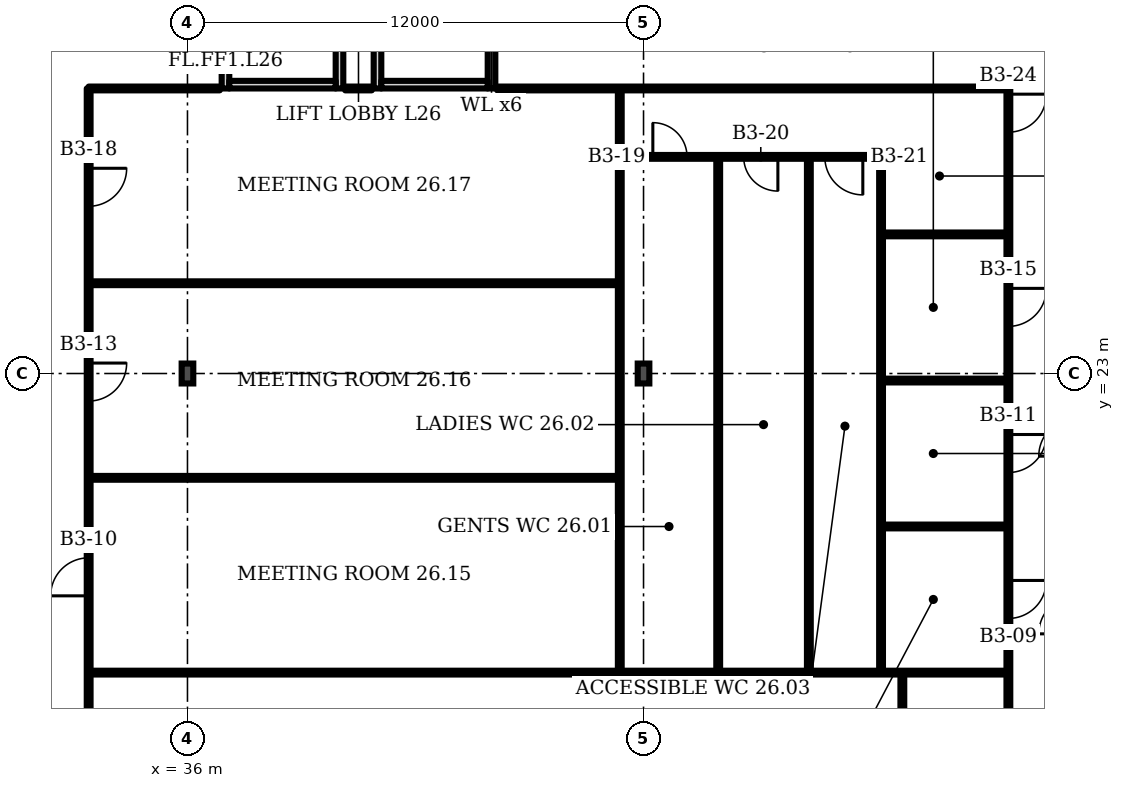
"""IFC4 building model, lengths in metres.
Left out: names, types, materials, properties, quantities, classifications, styles, units other than length and angle.
Written with IfcOpenShell. Run it as: python <this file> out.ifc"""

import sys

from ifc_helpers import new_model, si_unit, direction, frame, frame_2d, origin, origin_2d, place, context, subcontext, project, spatial, rectangle, i_section, extrude, element, fill, save


model = new_model("IFC4")
c1 = context("Model", 3, precision=1e-05, world=origin(), true_north=direction((0.0, 1.0)))
c2 = subcontext(c1, "Body", "Model", "MODEL_VIEW")
j1 = project(units=[si_unit("LENGTHUNIT", "METRE"), si_unit("PLANEANGLEUNIT", "RADIAN")], contexts=[c1])
p1 = place(None, origin())
s1 = spatial("IfcSite", under=j1, at=p1, CompositionType="ELEMENT")
p2 = place(p1, origin())
s2 = spatial("IfcBuilding", under=s1, at=p2, CompositionType="ELEMENT")
p3 = place(p2, frame((0.0, 0.0, 114.7)))
s3 = spatial("IfcBuildingStorey", under=s2, at=p3, CompositionType="ELEMENT", Elevation=114.7)
for number, where, z_axis, x_axis in (
    (1, (36.0, 23.0, 0.0), (0.0, 0.0, 1.0), (1.0, 0.0, 0.0)),
    (2, (48.0, 23.0, 0.0), (0.0, 0.0, 1.0), (1.0, 0.0, 0.0)),
):
    element("IfcColumn", number, at=place(p3, frame(where, z_axis=z_axis, x_axis=x_axis)), inside=s3, PredefinedType="COLUMN", context=c2, shape_type="SweptSolid", body=[
        extrude(i_section(OverallWidth=0.306, OverallDepth=0.524, WebThickness=0.021, FlangeThickness=0.04, FilletRadius=0.027, at=origin_2d()), origin(), (0.0, 0.0, 1.0), 3.6),
    ])
p4 = place(p3, frame((37.0, 30.5, 0.0), z_axis=(0.0, 0.0, 1.0), x_axis=(0.0, 1.0, 0.0)))
e3 = element("IfcWall", 3, at=p4, inside=s3, PredefinedType="PARTITIONING", context=c2, shape_type="SweptSolid", body=[
    extrude(rectangle(XDim=3.5, YDim=0.2, at=frame_2d((1.75, 0.0))), origin(), (0.0, 0.0, 1.0), 3.2),
])
p5 = place(p4, frame((1.2, 0.0, 0.0)))
e4 = element("IfcOpeningElement", 4, at=p5, cuts=e3, PredefinedType="OPENING", context=c2, shape_type="SweptSolid", body=[
    extrude(rectangle(XDim=1.1, YDim=2.1, at=frame_2d((0.55, 1.05))), frame((0.0, 0.11, 0.0), z_axis=(0.0, -1.0, 0.0), x_axis=(1.0, 0.0, 0.0)), (0.0, 0.0, 1.0), 0.22),
])
p6 = place(p3, frame((40.0, 30.5, 0.0), z_axis=(0.0, 0.0, 1.0), x_axis=(0.0, 1.0, 0.0)))
e5 = element("IfcWall", 5, at=p6, inside=s3, PredefinedType="PARTITIONING", context=c2, shape_type="SweptSolid", body=[
    extrude(rectangle(XDim=3.5, YDim=0.2, at=frame_2d((1.75, 0.0))), origin(), (0.0, 0.0, 1.0), 3.2),
])
p7 = place(p3, frame((37.1, 30.6, 0.0), z_axis=(0.0, 0.0, 1.0), x_axis=(1.0, 0.0, 0.0)))
e6 = element("IfcWall", 6, at=p7, inside=s3, PredefinedType="PARTITIONING", context=c2, shape_type="SweptSolid", body=[
    extrude(rectangle(XDim=2.8, YDim=0.2, at=frame_2d((1.4, 0.0))), origin(), (0.0, 0.0, 1.0), 3.2),
])
p8 = place(p3, frame((41.0, 30.5, 0.0), z_axis=(0.0, 0.0, 1.0), x_axis=(0.0, 1.0, 0.0)))
e7 = element("IfcWall", 7, at=p8, inside=s3, PredefinedType="PARTITIONING", context=c2, shape_type="SweptSolid", body=[
    extrude(rectangle(XDim=3.5, YDim=0.2, at=frame_2d((1.75, 0.0))), origin(), (0.0, 0.0, 1.0), 3.2),
])
p9 = place(p3, frame((44.0, 30.5, 0.0), z_axis=(0.0, 0.0, 1.0), x_axis=(0.0, 1.0, 0.0)))
e8 = element("IfcWall", 8, at=p9, inside=s3, PredefinedType="PARTITIONING", context=c2, shape_type="SweptSolid", body=[
    extrude(rectangle(XDim=3.5, YDim=0.2, at=frame_2d((1.75, 0.0))), origin(), (0.0, 0.0, 1.0), 3.2),
])
p10 = place(p9, frame((1.2, 0.0, 0.0)))
e9 = element("IfcOpeningElement", 9, at=p10, cuts=e8, PredefinedType="OPENING", context=c2, shape_type="SweptSolid", body=[
    extrude(rectangle(XDim=1.1, YDim=2.1, at=frame_2d((0.55, 1.05))), frame((0.0, 0.11, 0.0), z_axis=(0.0, -1.0, 0.0), x_axis=(1.0, 0.0, 0.0)), (0.0, 0.0, 1.0), 0.22),
])
p11 = place(p3, frame((41.1, 30.6, 0.0), z_axis=(0.0, 0.0, 1.0), x_axis=(1.0, 0.0, 0.0)))
e10 = element("IfcWall", 10, at=p11, inside=s3, PredefinedType="PARTITIONING", context=c2, shape_type="SweptSolid", body=[
    extrude(rectangle(XDim=2.8, YDim=0.2, at=frame_2d((1.4, 0.0))), origin(), (0.0, 0.0, 1.0), 3.2),
])
p12 = place(p3, frame((33.4, 10.22, 0.0), z_axis=(0.0, 0.0, 1.0), x_axis=(0.0, 1.0, 0.0)))
e11 = element("IfcWall", 11, at=p12, inside=s3, PredefinedType="PARTITIONING", context=c2, shape_type="SweptSolid", body=[
    extrude(rectangle(XDim=20.28, YDim=0.1, at=frame_2d((10.14, 0.0))), origin(), (0.0, 0.0, 1.0), 3.2),
])
p13 = place(p12, frame((6.93, 0.0, 0.0)))
e12 = element("IfcOpeningElement", 12, at=p13, cuts=e11, PredefinedType="OPENING", context=c2, shape_type="SweptSolid", body=[
    extrude(rectangle(XDim=1.0, YDim=2.1, at=frame_2d((0.5, 1.05))), frame((0.0, 0.06, 0.0), z_axis=(0.0, -1.0, 0.0), x_axis=(1.0, 0.0, 0.0)), (0.0, 0.0, 1.0), 0.12),
])
p14 = place(p12, frame((12.055, 0.0, 0.0)))
e13 = element("IfcOpeningElement", 13, at=p14, cuts=e11, PredefinedType="OPENING", context=c2, shape_type="SweptSolid", body=[
    extrude(rectangle(XDim=1.0, YDim=2.1, at=frame_2d((0.5, 1.05))), frame((0.0, 0.06, 0.0), z_axis=(0.0, -1.0, 0.0), x_axis=(1.0, 0.0, 0.0)), (0.0, 0.0, 1.0), 0.12),
])
p15 = place(p12, frame((17.18, 0.0, 0.0)))
e14 = element("IfcOpeningElement", 14, at=p15, cuts=e11, PredefinedType="OPENING", context=c2, shape_type="SweptSolid", body=[
    extrude(rectangle(XDim=1.0, YDim=2.1, at=frame_2d((0.5, 1.05))), frame((0.0, 0.06, 0.0), z_axis=(0.0, -1.0, 0.0), x_axis=(1.0, 0.0, 0.0)), (0.0, 0.0, 1.0), 0.12),
])
p16 = place(p3, frame((33.4, 15.13, 0.0), z_axis=(0.0, 0.0, 1.0), x_axis=(1.0, 0.0, 0.0)))
e15 = element("IfcWall", 15, at=p16, inside=s3, PredefinedType="PARTITIONING", context=c2, shape_type="SweptSolid", body=[
    extrude(rectangle(XDim=24.2, YDim=0.1, at=frame_2d((12.1, 0.0))), origin(), (0.0, 0.0, 1.0), 3.2),
])
for number, where, z_axis, x_axis in (
    (16, (33.4, 20.255, 0.0), (0.0, 0.0, 1.0), (1.0, 0.0, 0.0)),
    (17, (33.4, 25.375, 0.0), (0.0, 0.0, 1.0), (1.0, 0.0, 0.0)),
):
    element("IfcWall", number, at=place(p3, frame(where, z_axis=z_axis, x_axis=x_axis)), inside=s3, PredefinedType="PARTITIONING", context=c2, shape_type="SweptSolid", body=[
        extrude(rectangle(XDim=13.975, YDim=0.1, at=frame_2d((6.988, 0.0))), origin(), (0.0, 0.0, 1.0), 3.2),
    ])
p17 = place(p3, frame((33.4, 30.5, 0.0), z_axis=(0.0, 0.0, 1.0), x_axis=(1.0, 0.0, 0.0)))
e18 = element("IfcWall", 18, at=p17, inside=s3, PredefinedType="PARTITIONING", context=c2, shape_type="SweptSolid", body=[
    extrude(rectangle(XDim=3.45, YDim=0.1, at=frame_2d((1.725, 0.0))), origin(), (0.0, 0.0, 1.0), 3.2),
])
p18 = place(p3, frame((47.375, 15.13, 0.0), z_axis=(0.0, 0.0, 1.0), x_axis=(0.0, 1.0, 0.0)))
e19 = element("IfcWall", 19, at=p18, inside=s3, PredefinedType="PARTITIONING", context=c2, shape_type="SweptSolid", body=[
    extrude(rectangle(XDim=15.36, YDim=0.1, at=frame_2d((7.68, 0.0))), origin(), (0.0, 0.0, 1.0), 3.2),
])
p19 = place(p3, frame((47.375, 28.7, 0.0), z_axis=(0.0, 0.0, 1.0), x_axis=(1.0, 0.0, 0.0)))
e20 = element("IfcWall", 20, at=p19, inside=s3, PredefinedType="PARTITIONING", context=c2, shape_type="SweptSolid", body=[
    extrude(rectangle(XDim=6.875, YDim=0.1, at=frame_2d((3.438, 0.0))), origin(), (0.0, 0.0, 1.0), 3.2),
])
p20 = place(p19, frame((0.87, 0.0, 0.0)))
e21 = element("IfcOpeningElement", 21, at=p20, cuts=e20, PredefinedType="OPENING", context=c2, shape_type="SweptSolid", body=[
    extrude(rectangle(XDim=0.9, YDim=2.1, at=frame_2d((0.45, 1.05))), frame((0.0, 0.06, 0.0), z_axis=(0.0, -1.0, 0.0), x_axis=(1.0, 0.0, 0.0)), (0.0, 0.0, 1.0), 0.12),
])
p21 = place(p19, frame((3.26, 0.0, 0.0)))
e22 = element("IfcOpeningElement", 22, at=p21, cuts=e20, PredefinedType="OPENING", context=c2, shape_type="SweptSolid", body=[
    extrude(rectangle(XDim=0.9, YDim=2.1, at=frame_2d((0.45, 1.05))), frame((0.0, 0.06, 0.0), z_axis=(0.0, -1.0, 0.0), x_axis=(1.0, 0.0, 0.0)), (0.0, 0.0, 1.0), 0.12),
])
p22 = place(p19, frame((5.395, 0.0, 0.0)))
e23 = element("IfcOpeningElement", 23, at=p22, cuts=e20, PredefinedType="OPENING", context=c2, shape_type="SweptSolid", body=[
    extrude(rectangle(XDim=1.0, YDim=2.1, at=frame_2d((0.5, 1.05))), frame((0.0, 0.06, 0.0), z_axis=(0.0, -1.0, 0.0), x_axis=(1.0, 0.0, 0.0)), (0.0, 0.0, 1.0), 0.12),
])
for number, where, z_axis, x_axis in (
    (24, (49.965, 15.13, 0.0), (0.0, 0.0, 1.0), (0.0, 1.0, 0.0)),
    (25, (52.35, 15.13, 0.0), (0.0, 0.0, 1.0), (0.0, 1.0, 0.0)),
    (26, (54.25, 15.13, 0.0), (0.0, 0.0, 1.0), (0.0, 1.0, 0.0)),
):
    element("IfcWall", number, at=place(p3, frame(where, z_axis=z_axis, x_axis=x_axis)), inside=s3, PredefinedType="PARTITIONING", context=c2, shape_type="SweptSolid", body=[
        extrude(rectangle(XDim=13.57, YDim=0.1, at=frame_2d((6.785, 0.0))), origin(), (0.0, 0.0, 1.0), 3.2),
    ])
for number, where, z_axis, x_axis in (
    (27, (54.25, 18.975, 0.0), (0.0, 0.0, 1.0), (1.0, 0.0, 0.0)),
    (28, (54.25, 22.815, 0.0), (0.0, 0.0, 1.0), (1.0, 0.0, 0.0)),
    (29, (54.25, 26.66, 0.0), (0.0, 0.0, 1.0), (1.0, 0.0, 0.0)),
):
    element("IfcWall", number, at=place(p3, frame(where, z_axis=z_axis, x_axis=x_axis)), inside=s3, PredefinedType="PARTITIONING", context=c2, shape_type="SweptSolid", body=[
        extrude(rectangle(XDim=3.35, YDim=0.1, at=frame_2d((1.675, 0.0))), origin(), (0.0, 0.0, 1.0), 3.2),
    ])
p23 = place(p3, frame((54.81, -1.034, 0.0), z_axis=(0.0, 0.0, 1.0), x_axis=(0.0, 1.0, 0.0)))
e30 = element("IfcWall", 30, at=p23, inside=s3, PredefinedType="PARTITIONING", context=c2, shape_type="SweptSolid", body=[
    extrude(rectangle(XDim=16.164, YDim=0.1, at=frame_2d((8.082, 0.0))), origin(), (0.0, 0.0, 1.0), 2.58),
])
p24 = place(p3, frame((57.6, -0.79, 0.0), z_axis=(0.0, 0.0, 1.0), x_axis=(0.0, 1.0, 0.0)))
e31 = element("IfcWall", 31, at=p24, inside=s3, PredefinedType="PARTITIONING", context=c2, shape_type="SweptSolid", body=[
    extrude(rectangle(XDim=31.29, YDim=0.1, at=frame_2d((15.645, 0.0))), origin(), (0.0, 0.0, 1.0), 2.58),
])
p25 = place(p24, frame((7.5, 0.0, 0.0)))
e32 = element("IfcOpeningElement", 32, at=p25, cuts=e31, PredefinedType="OPENING", context=c2, shape_type="SweptSolid", body=[
    extrude(rectangle(XDim=1.0, YDim=2.1, at=frame_2d((0.5, 1.05))), frame((0.0, 0.06, 0.0), z_axis=(0.0, -1.0, 0.0), x_axis=(1.0, 0.0, 0.0)), (0.0, 0.0, 1.0), 0.12),
])
p26 = place(p24, frame((17.344, 0.0, 0.0)))
e33 = element("IfcOpeningElement", 33, at=p26, cuts=e31, PredefinedType="OPENING", context=c2, shape_type="SweptSolid", body=[
    extrude(rectangle(XDim=1.0, YDim=2.1, at=frame_2d((0.5, 1.05))), frame((0.0, 0.06, 0.0), z_axis=(0.0, -1.0, 0.0), x_axis=(1.0, 0.0, 0.0)), (0.0, 0.0, 1.0), 0.12),
])
p27 = place(p24, frame((21.185, 0.0, 0.0)))
e34 = element("IfcOpeningElement", 34, at=p27, cuts=e31, PredefinedType="OPENING", context=c2, shape_type="SweptSolid", body=[
    extrude(rectangle(XDim=1.0, YDim=2.1, at=frame_2d((0.5, 1.05))), frame((0.0, 0.06, 0.0), z_axis=(0.0, -1.0, 0.0), x_axis=(1.0, 0.0, 0.0)), (0.0, 0.0, 1.0), 0.12),
])
p28 = place(p24, frame((25.03, 0.0, 0.0)))
e35 = element("IfcOpeningElement", 35, at=p28, cuts=e31, PredefinedType="OPENING", context=c2, shape_type="SweptSolid", body=[
    extrude(rectangle(XDim=1.0, YDim=2.1, at=frame_2d((0.5, 1.05))), frame((0.0, 0.06, 0.0), z_axis=(0.0, -1.0, 0.0), x_axis=(1.0, 0.0, 0.0)), (0.0, 0.0, 1.0), 0.12),
])
p29 = place(p24, frame((30.139, 0.0, 0.0)))
e36 = element("IfcOpeningElement", 36, at=p29, cuts=e31, PredefinedType="OPENING", context=c2, shape_type="SweptSolid", body=[
    extrude(rectangle(XDim=1.0, YDim=2.1, at=frame_2d((0.5, 1.05))), frame((0.0, 0.06, 0.0), z_axis=(0.0, -1.0, 0.0), x_axis=(1.0, 0.0, 0.0)), (0.0, 0.0, 1.0), 0.12),
])
p30 = place(p3, frame((40.15, 30.5, 0.0), z_axis=(0.0, 0.0, 1.0), x_axis=(1.0, 0.0, 0.0)))
e37 = element("IfcWall", 37, at=p30, inside=s3, PredefinedType="PARTITIONING", context=c2, shape_type="SweptSolid", body=[
    extrude(rectangle(XDim=0.7, YDim=0.1, at=frame_2d((0.35, 0.0))), origin(), (0.0, 0.0, 1.0), 3.2),
])
p31 = place(p3, frame((44.15, 30.5, 0.0), z_axis=(0.0, 0.0, 1.0), x_axis=(1.0, 0.0, 0.0)))
e38 = element("IfcWall", 38, at=p31, inside=s3, PredefinedType="PARTITIONING", context=c2, shape_type="SweptSolid", body=[
    extrude(rectangle(XDim=13.45, YDim=0.1, at=frame_2d((6.725, 0.0))), origin(), (0.0, 0.0, 1.0), 3.2),
])
p32 = place(p26, origin())
e39 = element("IfcDoor", 39, at=p32, inside=s3, OperationType="SINGLE_SWING_RIGHT", PredefinedType="DOOR", context=c2, shape_type="SweptSolid", body=[
    extrude(rectangle(XDim=1.0, YDim=2.1, at=frame_2d((0.5, 1.05))), frame((0.0, 0.025, 0.0), z_axis=(0.0, -1.0, 0.0), x_axis=(1.0, 0.0, 0.0)), (0.0, 0.0, 1.0), 0.05),
])
fill(e33, e39)
p33 = place(p13, origin())
e40 = element("IfcDoor", 40, at=p33, inside=s3, OperationType="SINGLE_SWING_LEFT", PredefinedType="DOOR", context=c2, shape_type="SweptSolid", body=[
    extrude(rectangle(XDim=1.0, YDim=2.1, at=frame_2d((0.5, 1.05))), frame((0.0, 0.025, 0.0), z_axis=(0.0, -1.0, 0.0), x_axis=(1.0, 0.0, 0.0)), (0.0, 0.0, 1.0), 0.05),
])
fill(e12, e40)
p34 = place(p27, origin())
e41 = element("IfcDoor", 41, at=p34, inside=s3, OperationType="SINGLE_SWING_RIGHT", PredefinedType="DOOR", context=c2, shape_type="SweptSolid", body=[
    extrude(rectangle(XDim=1.0, YDim=2.1, at=frame_2d((0.5, 1.05))), frame((0.0, 0.025, 0.0), z_axis=(0.0, -1.0, 0.0), x_axis=(1.0, 0.0, 0.0)), (0.0, 0.0, 1.0), 0.05),
])
fill(e34, e41)
p35 = place(p14, origin())
e42 = element("IfcDoor", 42, at=p35, inside=s3, OperationType="SINGLE_SWING_RIGHT", PredefinedType="DOOR", context=c2, shape_type="SweptSolid", body=[
    extrude(rectangle(XDim=1.0, YDim=2.1, at=frame_2d((0.5, 1.05))), frame((0.0, 0.025, 0.0), z_axis=(0.0, -1.0, 0.0), x_axis=(1.0, 0.0, 0.0)), (0.0, 0.0, 1.0), 0.05),
])
fill(e13, e42)
p36 = place(p28, origin())
e43 = element("IfcDoor", 43, at=p36, inside=s3, OperationType="SINGLE_SWING_RIGHT", PredefinedType="DOOR", context=c2, shape_type="SweptSolid", body=[
    extrude(rectangle(XDim=1.0, YDim=2.1, at=frame_2d((0.5, 1.05))), frame((0.0, 0.025, 0.0), z_axis=(0.0, -1.0, 0.0), x_axis=(1.0, 0.0, 0.0)), (0.0, 0.0, 1.0), 0.05),
])
fill(e35, e43)
p37 = place(p15, origin())
e44 = element("IfcDoor", 44, at=p37, inside=s3, OperationType="SINGLE_SWING_RIGHT", PredefinedType="DOOR", context=c2, shape_type="SweptSolid", body=[
    extrude(rectangle(XDim=1.0, YDim=2.1, at=frame_2d((0.5, 1.05))), frame((0.0, 0.025, 0.0), z_axis=(0.0, -1.0, 0.0), x_axis=(1.0, 0.0, 0.0)), (0.0, 0.0, 1.0), 0.05),
])
fill(e14, e44)
p38 = place(p20, origin())
e45 = element("IfcDoor", 45, at=p38, inside=s3, OperationType="SINGLE_SWING_LEFT", PredefinedType="DOOR", context=c2, shape_type="SweptSolid", body=[
    extrude(rectangle(XDim=0.9, YDim=2.1, at=frame_2d((0.45, 1.05))), frame((0.0, 0.025, 0.0), z_axis=(0.0, -1.0, 0.0), x_axis=(1.0, 0.0, 0.0)), (0.0, 0.0, 1.0), 0.05),
])
fill(e21, e45)
p39 = place(p21, origin())
e46 = element("IfcDoor", 46, at=p39, inside=s3, OperationType="SINGLE_SWING_RIGHT", PredefinedType="DOOR", context=c2, shape_type="SweptSolid", body=[
    extrude(rectangle(XDim=0.9, YDim=2.1, at=frame_2d((0.45, 1.05))), frame((0.0, 0.025, 0.0), z_axis=(0.0, -1.0, 0.0), x_axis=(1.0, 0.0, 0.0)), (0.0, 0.0, 1.0), 0.05),
])
fill(e22, e46)
p40 = place(p22, origin())
e47 = element("IfcDoor", 47, at=p40, inside=s3, OperationType="SINGLE_SWING_RIGHT", PredefinedType="DOOR", context=c2, shape_type="SweptSolid", body=[
    extrude(rectangle(XDim=1.0, YDim=2.1, at=frame_2d((0.5, 1.05))), frame((0.0, 0.025, 0.0), z_axis=(0.0, -1.0, 0.0), x_axis=(1.0, 0.0, 0.0)), (0.0, 0.0, 1.0), 0.05),
])
fill(e23, e47)
p41 = place(p29, origin())
e48 = element("IfcDoor", 48, at=p41, inside=s3, OperationType="SINGLE_SWING_RIGHT", PredefinedType="DOOR", context=c2, shape_type="SweptSolid", body=[
    extrude(rectangle(XDim=1.0, YDim=2.1, at=frame_2d((0.5, 1.05))), frame((0.0, 0.025, 0.0), z_axis=(0.0, -1.0, 0.0), x_axis=(1.0, 0.0, 0.0)), (0.0, 0.0, 1.0), 0.05),
])
fill(e36, e48)
save(model, sys.argv[1])
